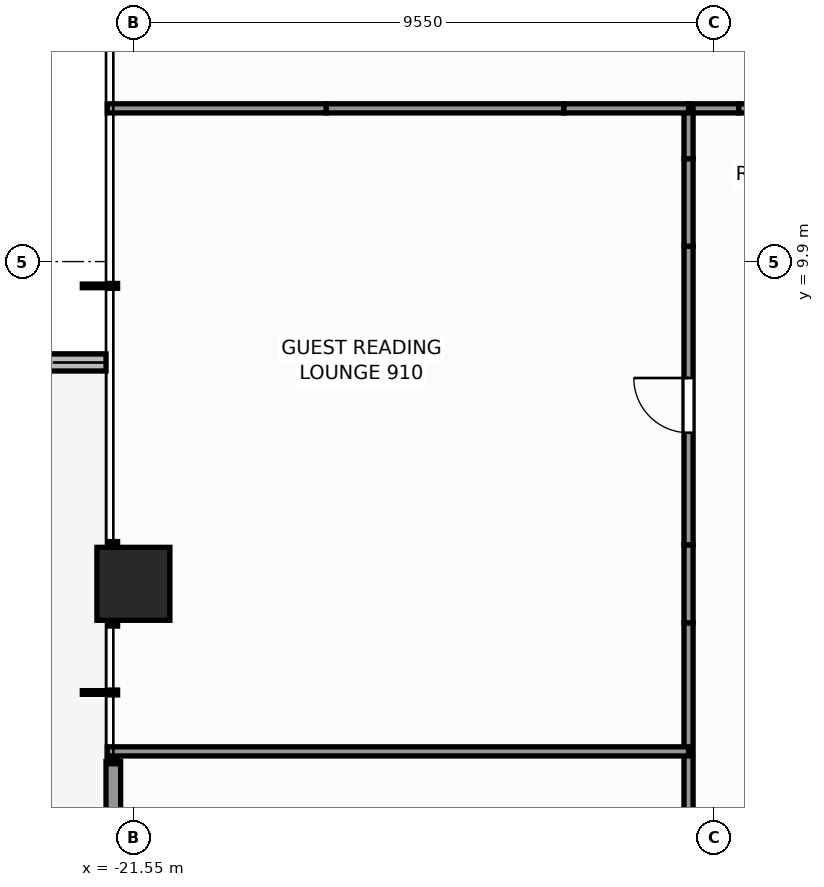
"""IFC4 building model, lengths in metres.
Left out: names, types, materials, properties, quantities, classifications, styles, units other than length and angle.
Written with IfcOpenShell. Run it as: python <this file> out.ifc"""

import sys

from ifc_helpers import new_model, si_unit, direction, frame, frame_2d, origin, origin_2d, place, context, subcontext, project, spatial, rectangle, extrude, element, fill, save


model = new_model("IFC4")
c1 = context("Model", 3, precision=1e-05, world=origin(), true_north=direction((0.0, 1.0)))
c2 = subcontext(c1, "Body", "Model", "MODEL_VIEW")
j1 = project(units=[si_unit("LENGTHUNIT", "METRE"), si_unit("PLANEANGLEUNIT", "RADIAN")], contexts=[c1])
p1 = place(None, origin())
s1 = spatial("IfcSite", under=j1, at=p1, CompositionType="ELEMENT")
p2 = place(p1, origin())
s2 = spatial("IfcBuilding", under=s1, at=p2, CompositionType="ELEMENT")
p3 = place(p2, frame((0.0, 0.0, 33.7)))
s3 = spatial("IfcBuildingStorey", under=s2, at=p3, CompositionType="ELEMENT", Elevation=33.7)
p4 = place(p3, frame((-21.55, 4.6, 0.0), z_axis=(0.0, 0.0, 1.0), x_axis=(1.0, 0.0, 0.0)))
e1 = element("IfcColumn", 1, at=p4, inside=s3, PredefinedType="COLUMN", context=c2, shape_type="SweptSolid", body=[
    extrude(rectangle(XDim=1.2, YDim=1.2, at=origin_2d()), origin(), (0.0, 0.0, 1.0), 3.3),
])
p5 = place(p3, frame((-22.0, 8.24, -0.06), z_axis=(0.0, 0.0, 1.0), x_axis=(-1.0, 0.0, 0.0)))
e2 = element("IfcWall", 2, at=p5, inside=s3, PredefinedType="PARAPET", context=c2, shape_type="SweptSolid", body=[
    extrude(rectangle(XDim=3.214, YDim=0.28, at=frame_2d((1.607, 0.0))), origin(), (0.0, 0.0, 1.0), 0.42),
])
p6 = place(p3, frame((-21.88, -1.68, 0.0), z_axis=(0.0, 0.0, 1.0), x_axis=(0.0, 1.0, 0.0)))
e3 = element("IfcWall", 3, at=p6, inside=s3, PredefinedType="STANDARD", context=c2, shape_type="SweptSolid", body=[
    extrude(rectangle(XDim=3.36, YDim=0.24, at=frame_2d((1.68, 0.0))), origin(), (0.0, 0.0, 1.0), 3.06),
])
p7 = place(p6, frame((0.78, 0.0, 0.0)))
e4 = element("IfcOpeningElement", 4, at=p7, cuts=e3, PredefinedType="OPENING", context=c2, shape_type="SweptSolid", body=[
    extrude(rectangle(XDim=1.8, YDim=2.2, at=frame_2d((0.9, 1.1))), frame((0.0, 0.13, 0.0), z_axis=(0.0, -1.0, 0.0), x_axis=(1.0, 0.0, 0.0)), (0.0, 0.0, 1.0), 0.26),
])
p8 = place(p3, frame((-12.42, 12.42, 0.0), z_axis=(0.0, 0.0, 1.0), x_axis=(1.0, 0.0, 0.0)))
e5 = element("IfcWall", 5, at=p8, inside=s3, PredefinedType="PARTITIONING", context=c2, shape_type="SweptSolid", body=[
    extrude(rectangle(XDim=0.827, YDim=0.15, at=frame_2d((0.414, 0.0))), origin(), (0.0, 0.0, 1.0), 3.06),
])
p9 = place(p3, frame((-11.593, 12.42, 0.0), z_axis=(0.0, 0.0, 1.0), x_axis=(1.0, 0.0, 0.0)))
e6 = element("IfcWall", 6, at=p9, inside=s3, PredefinedType="PARTITIONING", context=c2, shape_type="SweptSolid", body=[
    extrude(rectangle(XDim=1.439, YDim=0.15, at=frame_2d((0.72, 0.0))), origin(), (0.0, 0.0, 1.0), 1.945),
])
p10 = place(p3, frame((-12.42, -3.958, 0.0), z_axis=(0.0, 0.0, 1.0), x_axis=(0.0, 1.0, 0.0)))
e7 = element("IfcWall", 7, at=p10, inside=s3, PredefinedType="PARTITIONING", context=c2, shape_type="SweptSolid", body=[
    extrude(rectangle(XDim=7.916, YDim=0.15, at=frame_2d((3.958, 0.0))), origin(), (0.0, 0.0, 1.0), 2.585),
])
p11 = place(p10, frame((1.478, 0.0, 0.0)))
e8 = element("IfcOpeningElement", 8, at=p11, cuts=e7, PredefinedType="OPENING", context=c2, shape_type="SweptSolid", body=[
    extrude(rectangle(XDim=0.9, YDim=2.06, at=frame_2d((0.45, 1.03))), frame((0.0, 0.085, 0.0), z_axis=(0.0, -1.0, 0.0), x_axis=(1.0, 0.0, 0.0)), (0.0, 0.0, 1.0), 0.17),
])
p12 = place(p3, frame((-12.42, 3.958, 0.0), z_axis=(0.0, 0.0, 1.0), x_axis=(0.0, 1.0, 0.0)))
e9 = element("IfcWall", 9, at=p12, inside=s3, PredefinedType="PARTITIONING", context=c2, shape_type="SweptSolid", body=[
    extrude(rectangle(XDim=1.284, YDim=0.15, at=frame_2d((0.642, 0.0))), origin(), (0.0, 0.0, 1.0), 1.945),
])
p13 = place(p3, frame((-12.42, 5.242, 0.0), z_axis=(0.0, 0.0, 1.0), x_axis=(0.0, 1.0, 0.0)))
e10 = element("IfcWall", 10, at=p13, inside=s3, PredefinedType="PARTITIONING", context=c2, shape_type="SweptSolid", body=[
    extrude(rectangle(XDim=4.912, YDim=0.15, at=frame_2d((2.456, 0.0))), origin(), (0.0, 0.0, 1.0), 3.06),
])
p14 = place(p13, frame((1.843, 0.0, 0.0)))
e11 = element("IfcOpeningElement", 11, at=p14, cuts=e10, PredefinedType="OPENING", context=c2, shape_type="SweptSolid", body=[
    extrude(rectangle(XDim=0.9, YDim=2.06, at=frame_2d((0.45, 1.03))), frame((0.0, 0.085, 0.0), z_axis=(0.0, -1.0, 0.0), x_axis=(1.0, 0.0, 0.0)), (0.0, 0.0, 1.0), 0.17),
])
p15 = place(p3, frame((-12.42, 10.154, 0.0), z_axis=(0.0, 0.0, 1.0), x_axis=(0.0, 1.0, 0.0)))
e12 = element("IfcWall", 12, at=p15, inside=s3, PredefinedType="PARTITIONING", context=c2, shape_type="SweptSolid", body=[
    extrude(rectangle(XDim=1.439, YDim=0.15, at=frame_2d((0.72, 0.0))), origin(), (0.0, 0.0, 1.0), 1.945),
])
p16 = place(p3, frame((-12.42, 11.593, 0.0), z_axis=(0.0, 0.0, 1.0), x_axis=(0.0, 1.0, 0.0)))
e13 = element("IfcWall", 13, at=p16, inside=s3, PredefinedType="PARTITIONING", context=c2, shape_type="SweptSolid", body=[
    extrude(rectangle(XDim=0.827, YDim=0.15, at=frame_2d((0.414, 0.0))), origin(), (0.0, 0.0, 1.0), 3.06),
])
p17 = place(p3, frame((-21.98, 12.42, 0.0), z_axis=(0.0, 0.0, 1.0), x_axis=(1.0, 0.0, 0.0)))
e14 = element("IfcWall", 14, at=p17, inside=s3, PredefinedType="PARTITIONING", context=c2, shape_type="SweptSolid", body=[
    extrude(rectangle(XDim=3.602, YDim=0.15, at=frame_2d((1.801, 0.0))), origin(), (0.0, 0.0, 1.0), 2.429),
])
p18 = place(p3, frame((-18.378, 12.42, 0.0), z_axis=(0.0, 0.0, 1.0), x_axis=(1.0, 0.0, 0.0)))
e15 = element("IfcWall", 15, at=p18, inside=s3, PredefinedType="PARTITIONING", context=c2, shape_type="SweptSolid", body=[
    extrude(rectangle(XDim=3.907, YDim=0.15, at=frame_2d((1.954, 0.0))), origin(), (0.0, 0.0, 1.0), 1.945),
])
p19 = place(p3, frame((-14.47, 12.42, 0.0), z_axis=(0.0, 0.0, 1.0), x_axis=(1.0, 0.0, 0.0)))
e16 = element("IfcWall", 16, at=p19, inside=s3, PredefinedType="PARTITIONING", context=c2, shape_type="SweptSolid", body=[
    extrude(rectangle(XDim=2.05, YDim=0.15, at=frame_2d((1.025, 0.0))), origin(), (0.0, 0.0, 1.0), 3.06),
])
p20 = place(p3, frame((-21.98, 1.844, 0.0), z_axis=(0.0, 0.0, 1.0), x_axis=(1.0, 0.0, 0.0)))
e17 = element("IfcWall", 17, at=p20, inside=s3, PredefinedType="PARTITIONING", context=c2, shape_type="SweptSolid", body=[
    extrude(rectangle(XDim=9.56, YDim=0.15, at=frame_2d((4.78, 0.0))), origin(), (0.0, 0.0, 1.0), 2.429),
])
p21 = place(p14, origin())
e18 = element("IfcDoor", 18, at=p21, inside=s3, OperationType="SINGLE_SWING_RIGHT", PredefinedType="DOOR", context=c2, shape_type="SweptSolid", body=[
    extrude(rectangle(XDim=0.9, YDim=2.06, at=frame_2d((0.45, 1.03))), frame((0.0, 0.025, 0.0), z_axis=(0.0, -1.0, 0.0), x_axis=(1.0, 0.0, 0.0)), (0.0, 0.0, 1.0), 0.05),
])
fill(e11, e18)
save(model, sys.argv[1])
